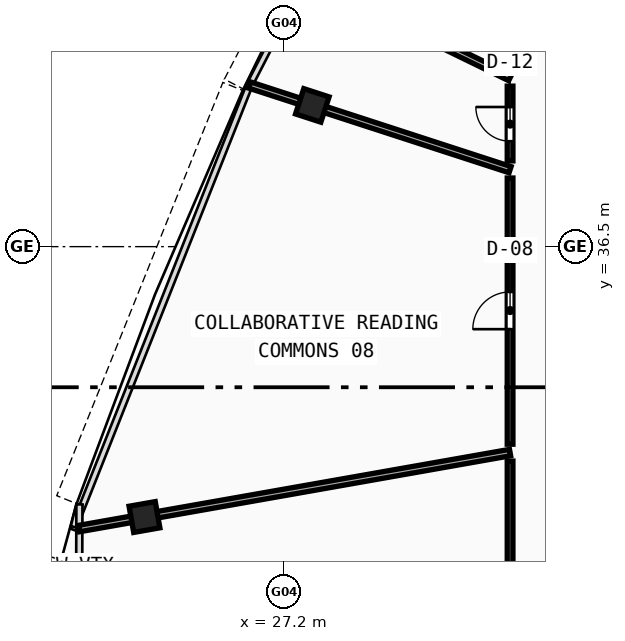
"""IFC4 building model, lengths in metres.
Left out: names, types, materials, properties, quantities, classifications, styles, units other than length and angle.
Written with IfcOpenShell. Run it as: python <this file> out.ifc"""

import sys

from ifc_helpers import new_model, si_unit, direction, frame, frame_2d, origin, origin_with_axes, origin_2d, place, context, subcontext, project, spatial, rectangle, hollow_rectangle, extrude, source, transform, mapped, element, fill, save


model = new_model("IFC4")
c1 = context("Model", 3, precision=1e-05, world=origin(), true_north=direction((0.0, 1.0)))
c2 = subcontext(c1, "Body", "Model", "MODEL_VIEW")
j1 = project(units=[si_unit("LENGTHUNIT", "METRE"), si_unit("PLANEANGLEUNIT", "RADIAN")], contexts=[c1])
p1 = place(None, origin())
s1 = spatial("IfcSite", under=j1, at=p1, CompositionType="ELEMENT")
p2 = place(p1, origin())
s2 = spatial("IfcBuilding", under=s1, at=p2, CompositionType="ELEMENT")
p3 = place(p2, frame((0.0, 0.0, 363.01)))
s3 = spatial("IfcBuildingStorey", under=s2, at=p3, CompositionType="ELEMENT", Elevation=363.01)
m1 = source(origin(), c2, "Body", "SweptSolid", [
    extrude(hollow_rectangle(XDim=0.7, YDim=0.7, WallThickness=0.026, at=origin_2d()), origin(), (0.0, 0.0, 1.0), 3.73),
])
for number, where, z_axis, x_axis in (
    (1, (27.947, 40.216, -0.26), (0.0, 0.0, 1.0), (-0.309, -0.951, 0.0)),
    (2, (23.53, 29.385, -0.26), (0.0, 0.0, 1.0), (0.174, -0.985, 0.0)),
):
    element("IfcColumn", number, at=place(p3, frame(where, z_axis=z_axis, x_axis=x_axis)), inside=s3, PredefinedType="COLUMN", context=c2, shape_type="MappedRepresentation", body=[
        mapped(m1, transform((0.0, 0.0, 0.0), scale=1.0)),
    ])
p4 = place(p3, frame((33.15, 40.943, 0.0), z_axis=(0.0, 0.0, 1.0), x_axis=(-0.898803189206, 0.438352400557, 0.0)))
e3 = element("IfcWall", 3, at=p4, inside=s3, PredefinedType="PARTITIONING", context=c2, shape_type="SweptSolid", body=[
    extrude(rectangle(XDim=6.01, YDim=0.17, at=frame_2d((3.005, 0.0))), origin(), (0.0, 0.0, 1.0), 2.87),
])
p5 = place(p3, frame((33.15, 38.525, 0.0), z_axis=(0.0, 0.0, 1.0), x_axis=(-0.951060950279, 0.309003347644, 0.0)))
e4 = element("IfcWall", 4, at=p5, inside=s3, PredefinedType="PARTITIONING", context=c2, shape_type="SweptSolid", body=[
    extrude(rectangle(XDim=7.207, YDim=0.17, at=frame_2d((3.604, 0.0))), origin(), (0.0, 0.0, 1.0), 2.87),
])
p6 = place(p3, frame((33.15, 31.082, 0.0), z_axis=(0.0, 0.0, 1.0), x_axis=(-0.984809370591, -0.17363900367, 0.0)))
e5 = element("IfcWall", 5, at=p6, inside=s3, PredefinedType="PARTITIONING", context=c2, shape_type="SweptSolid", body=[
    extrude(rectangle(XDim=11.517, YDim=0.17, at=frame_2d((5.758, 0.0))), origin(), (0.0, 0.0, 1.0), 2.87),
])
p7 = place(p3, frame((33.15, 24.9, 0.0), z_axis=(0.0, 0.0, 1.0), x_axis=(0.0, 1.0, 0.0)))
e6 = element("IfcWall", 6, at=p7, inside=s3, PredefinedType="PARTITIONING", context=c2, shape_type="SweptSolid", body=[
    extrude(rectangle(XDim=5.958, YDim=0.15, at=frame_2d((2.979, 0.0))), origin(), (0.0, 0.0, 1.0), 2.87),
])
p8 = place(p3, frame((33.15, 31.301, 0.0), z_axis=(0.0, 0.0, 1.0), x_axis=(0.0, 1.0, 0.0)))
e7 = element("IfcWall", 7, at=p8, inside=s3, PredefinedType="PARTITIONING", context=c2, shape_type="SweptSolid", body=[
    extrude(rectangle(XDim=7.004, YDim=0.15, at=frame_2d((3.502, 0.0))), origin(), (0.0, 0.0, 1.0), 3.47),
])
p9 = place(p8, frame((3.027, 0.0, 0.0)))
e8 = element("IfcOpeningElement", 8, at=p9, cuts=e7, PredefinedType="OPENING", context=c2, shape_type="SweptSolid", body=[
    extrude(rectangle(XDim=0.98, YDim=2.12, at=frame_2d((0.49, 1.06))), frame((0.0, 0.085, 0.0), z_axis=(0.0, -1.0, 0.0), x_axis=(1.0, 0.0, 0.0)), (0.0, 0.0, 1.0), 0.17),
])
p10 = place(p3, frame((33.15, 38.756, 0.0), z_axis=(0.0, 0.0, 1.0), x_axis=(0.0, 1.0, 0.0)))
e9 = element("IfcWall", 9, at=p10, inside=s3, PredefinedType="PARTITIONING", context=c2, shape_type="SweptSolid", body=[
    extrude(rectangle(XDim=1.967, YDim=0.15, at=frame_2d((0.983, 0.0))), origin(), (0.0, 0.0, 1.0), 3.12),
])
p11 = place(p10, frame((0.518, 0.0, 0.0)))
e10 = element("IfcOpeningElement", 10, at=p11, cuts=e9, PredefinedType="OPENING", context=c2, shape_type="SweptSolid", body=[
    extrude(rectangle(XDim=0.9, YDim=2.08, at=frame_2d((0.45, 1.04))), frame((0.0, 0.085, 0.0), z_axis=(0.0, -1.0, 0.0), x_axis=(1.0, 0.0, 0.0)), (0.0, 0.0, 1.0), 0.17),
])
p12 = place(p3, frame((33.15, 41.188, 0.0), z_axis=(0.0, 0.0, 1.0), x_axis=(0.0, 1.0, 0.0)))
e11 = element("IfcWall", 11, at=p12, inside=s3, PredefinedType="PARTITIONING", context=c2, shape_type="SweptSolid", body=[
    extrude(rectangle(XDim=1.012, YDim=0.15, at=frame_2d((0.506, 0.0))), origin(), (0.0, 0.0, 1.0), 3.47),
])
m2 = source(origin(), c2, "Body", "SweptSolid", [
    extrude(rectangle(XDim=0.9, YDim=2.08, at=frame_2d((0.45, 1.04))), frame((0.0, 0.025, 0.0), z_axis=(0.0, -1.0, 0.0), x_axis=(1.0, 0.0, 0.0)), (0.0, 0.0, 1.0), 0.05),
])
p13 = place(p11, origin_with_axes())
e12 = element("IfcDoor", 12, at=p13, inside=s3, OperationType="SINGLE_SWING_RIGHT", PredefinedType="DOOR", context=c2, shape_type="MappedRepresentation", body=[
    mapped(m2, transform((0.0, 0.0, 0.0), scale=1.0)),
])
fill(e10, e12)
m3 = source(origin(), c2, "Body", "SweptSolid", [
    extrude(rectangle(XDim=0.98, YDim=2.12, at=frame_2d((0.49, 1.06))), frame((0.0, 0.025, 0.0), z_axis=(0.0, -1.0, 0.0), x_axis=(1.0, 0.0, 0.0)), (0.0, 0.0, 1.0), 0.05),
])
p14 = place(p9, origin_with_axes())
e13 = element("IfcDoor", 13, at=p14, inside=s3, OperationType="SINGLE_SWING_LEFT", PredefinedType="DOOR", context=c2, shape_type="MappedRepresentation", body=[
    mapped(m3, transform((0.0, 0.0, 0.0), scale=1.0)),
])
fill(e8, e13)
save(model, sys.argv[1])
